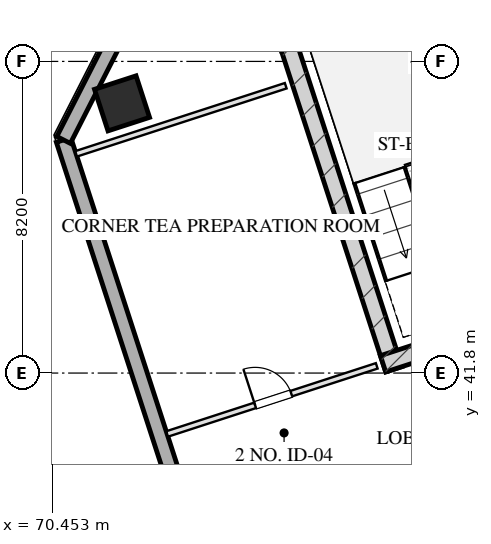
"""IFC4 building model, lengths in metres.
Left out: names, types, materials, properties, quantities, classifications, styles, units other than length and angle.
Written with IfcOpenShell. Run it as: python <this file> out.ifc"""

import sys

from ifc_helpers import new_model, si_unit, direction, frame, frame_2d, origin, origin_2d, place, context, subcontext, project, spatial, rectangle, hollow_rectangle, extrude, element, fill, save


model = new_model("IFC4")
c1 = context("Model", 3, precision=1e-05, world=origin(), true_north=direction((0.0, 1.0)))
c2 = subcontext(c1, "Body", "Model", "MODEL_VIEW")
j1 = project(units=[si_unit("LENGTHUNIT", "METRE"), si_unit("PLANEANGLEUNIT", "RADIAN")], contexts=[c1])
p1 = place(None, origin())
s1 = spatial("IfcSite", under=j1, at=p1, CompositionType="ELEMENT")
p2 = place(p1, origin())
s2 = spatial("IfcBuilding", under=s1, at=p2, CompositionType="ELEMENT")
p3 = place(p2, frame((0.0, 0.0, 212.75)))
s3 = spatial("IfcBuildingStorey", under=s2, at=p3, CompositionType="ELEMENT", Elevation=212.75)
p4 = place(p3, frame((79.442, 41.899, 0.0), z_axis=(0.0, 0.0, 1.0), x_axis=(-0.309035778627, 0.951050412717, 0.0)))
e1 = element("IfcWall", 1, at=p4, inside=s3, PredefinedType="SHEAR", context=c2, shape_type="SweptSolid", body=[
    extrude(rectangle(XDim=9.33, YDim=0.45, at=frame_2d((4.665, 0.0))), origin(), (0.0, 0.0, 1.0), 3.45),
])
p5 = place(p3, frame((79.159, 42.043, 0.0), z_axis=(0.0, 0.0, 1.0), x_axis=(0.951047485828, 0.309044785913, 0.0)))
e2 = element("IfcWall", 2, at=p5, inside=s3, PredefinedType="SHEAR", context=c2, shape_type="SweptSolid", body=[
    extrude(rectangle(XDim=4.145, YDim=0.45, at=frame_2d((2.073, 0.0))), origin(), (0.0, 0.0, 1.0), 3.45),
])
p6 = place(p3, frame((72.29, 48.896, 0.0), z_axis=(0.0, 0.0, 1.0), x_axis=(0.951056516295, 0.309016994375, 0.0)))
e3 = element("IfcColumn", 3, at=p6, inside=s3, PredefinedType="COLUMN", context=c2, shape_type="SweptSolid", body=[
    extrude(hollow_rectangle(XDim=1.15, YDim=1.15, WallThickness=0.04, at=origin_2d()), origin(), (0.0, 0.0, 1.0), 3.451),
])
p7 = place(p3, frame((82.618, 11.414, 0.0), z_axis=(0.0, 0.0, 1.0), x_axis=(-0.309016491071, 0.951056679828, 0.0)))
e4 = element("IfcWall", 4, at=p7, inside=s3, PredefinedType="SOLIDWALL", context=c2, shape_type="SweptSolid", body=[
    extrude(rectangle(XDim=38.4, YDim=0.4, at=frame_2d((19.2, 0.0))), origin(), (0.0, 0.0, 1.0), 2.55),
])
p8 = place(p7, frame((11.75, 0.0, 0.75)))
e5 = element("IfcOpeningElement", 5, at=p8, cuts=e4, PredefinedType="OPENING", context=c2, shape_type="SweptSolid", body=[
    extrude(rectangle(XDim=2.1, YDim=1.4, at=frame_2d((1.05, 0.7))), frame((0.0, 0.21, 0.0), z_axis=(0.0, -1.0, 0.0), x_axis=(1.0, 0.0, 0.0)), (0.0, 0.0, 1.0), 0.42),
])
p9 = place(p7, frame((15.55, 0.0, 0.75)))
e6 = element("IfcOpeningElement", 6, at=p9, cuts=e4, PredefinedType="OPENING", context=c2, shape_type="SweptSolid", body=[
    extrude(rectangle(XDim=2.1, YDim=1.4, at=frame_2d((1.05, 0.7))), frame((0.0, 0.21, 0.0), z_axis=(0.0, -1.0, 0.0), x_axis=(1.0, 0.0, 0.0)), (0.0, 0.0, 1.0), 0.42),
])
p10 = place(p7, frame((20.75, 0.0, 0.75)))
e7 = element("IfcOpeningElement", 7, at=p10, cuts=e4, PredefinedType="OPENING", context=c2, shape_type="SweptSolid", body=[
    extrude(rectangle(XDim=2.1, YDim=1.4, at=frame_2d((1.05, 0.7))), frame((0.0, 0.21, 0.0), z_axis=(0.0, -1.0, 0.0), x_axis=(1.0, 0.0, 0.0)), (0.0, 0.0, 1.0), 0.42),
])
p11 = place(p7, frame((24.55, 0.0, 0.75)))
e8 = element("IfcOpeningElement", 8, at=p11, cuts=e4, PredefinedType="OPENING", context=c2, shape_type="SweptSolid", body=[
    extrude(rectangle(XDim=2.1, YDim=1.4, at=frame_2d((1.05, 0.7))), frame((0.0, 0.21, 0.0), z_axis=(0.0, -1.0, 0.0), x_axis=(1.0, 0.0, 0.0)), (0.0, 0.0, 1.0), 0.42),
])
p12 = place(p3, frame((70.752, 47.934, 0.0), z_axis=(0.0, 0.0, 1.0), x_axis=(0.453949291228, 0.891027519774, 0.0)))
e9 = element("IfcWall", 9, at=p12, inside=s3, PredefinedType="SOLIDWALL", context=c2, shape_type="SweptSolid", body=[
    extrude(rectangle(XDim=3.111, YDim=0.4, at=frame_2d((1.556, 0.0))), origin(), (0.0, 0.0, 1.0), 2.55),
])
p13 = place(p3, frame((71.081, 47.568, 0.0), z_axis=(0.0, 0.0, 1.0), x_axis=(0.951059431056, 0.309008023519, 0.0)))
e10 = element("IfcWall", 10, at=p13, inside=s3, PredefinedType="PARTITIONING", context=c2, shape_type="SweptSolid", body=[
    extrude(rectangle(XDim=5.8, YDim=0.15, at=frame_2d((2.9, 0.0))), origin(), (0.0, 0.0, 1.0), 3.155),
])
p14 = place(p3, frame((73.476, 40.197, 0.0), z_axis=(0.0, 0.0, 1.0), x_axis=(0.951059431056, 0.309008023519, 0.0)))
e11 = element("IfcWall", 11, at=p14, inside=s3, PredefinedType="PARTITIONING", context=c2, shape_type="SweptSolid", body=[
    extrude(rectangle(XDim=5.8, YDim=0.15, at=frame_2d((2.9, 0.0))), origin(), (0.0, 0.0, 1.0), 2.15),
])
p15 = place(p14, frame((2.436, 0.0, 0.0)))
e12 = element("IfcOpeningElement", 12, at=p15, cuts=e11, PredefinedType="OPENING", context=c2, shape_type="SweptSolid", body=[
    extrude(rectangle(XDim=1.0, YDim=2.05, at=frame_2d((0.5, 1.025))), frame((0.0, 0.085, 0.0), z_axis=(0.0, -1.0, 0.0), x_axis=(1.0, 0.0, 0.0)), (0.0, 0.0, 1.0), 0.17),
])
p16 = place(p15, origin())
e13 = element("IfcDoor", 13, at=p16, inside=s3, OperationType="SINGLE_SWING_LEFT", PredefinedType="DOOR", context=c2, shape_type="SweptSolid", body=[
    extrude(rectangle(XDim=1.0, YDim=2.05, at=frame_2d((0.5, 1.025))), frame((0.0, 0.025, 0.0), z_axis=(0.0, -1.0, 0.0), x_axis=(1.0, 0.0, 0.0)), (0.0, 0.0, 1.0), 0.05),
])
fill(e12, e13)
save(model, sys.argv[1])
